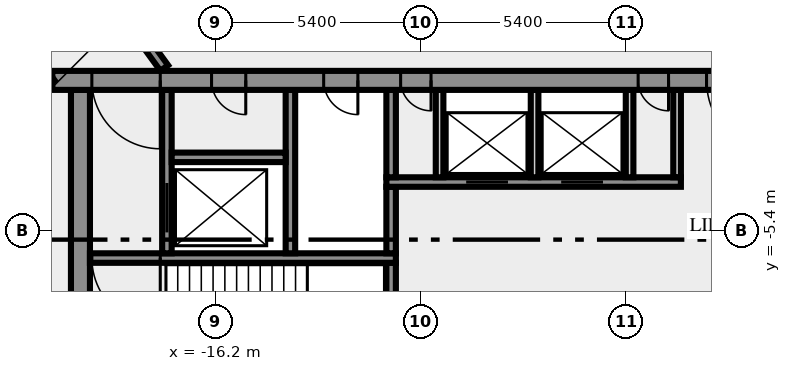
"""IFC4 building model, lengths in metres.
Left out: names, types, materials, properties, quantities, classifications, styles, units other than length and angle.
Written with IfcOpenShell. Run it as: python <this file> out.ifc"""

import sys

from ifc_helpers import new_model, si_unit, direction, frame, frame_2d, origin, place, context, subcontext, project, spatial, rectangle, extrude, element, fill, save


model = new_model("IFC4")
c1 = context("Model", 3, precision=1e-05, world=origin(), true_north=direction((0.0, 1.0)))
c2 = subcontext(c1, "Body", "Model", "MODEL_VIEW")
j1 = project(units=[si_unit("LENGTHUNIT", "METRE"), si_unit("PLANEANGLEUNIT", "RADIAN")], contexts=[c1])
p1 = place(None, origin())
s1 = spatial("IfcSite", under=j1, at=p1, CompositionType="ELEMENT")
p2 = place(p1, origin())
s2 = spatial("IfcBuilding", under=s1, at=p2, CompositionType="ELEMENT")
p3 = place(p2, frame((0.0, 0.0, 289.0)))
s3 = spatial("IfcBuildingStorey", under=s2, at=p3, CompositionType="ELEMENT", Elevation=289.0)
p4 = place(p3, frame((-19.75, -10.5, 0.0), z_axis=(0.0, 0.0, 1.0), x_axis=(0.0, 1.0, 0.0)))
e1 = element("IfcWall", 1, at=p4, inside=s3, PredefinedType="SHEAR", context=c2, shape_type="SweptSolid", body=[
    extrude(rectangle(XDim=8.8, YDim=0.5, at=frame_2d((4.4, 0.0))), origin(), (0.0, 0.0, 1.0), 3.65),
])
p5 = place(p3, frame((-11.575, -7.25, 0.0), z_axis=(0.0, 0.0, 1.0), x_axis=(0.0, 1.0, 0.0)))
e2 = element("IfcWall", 2, at=p5, inside=s3, PredefinedType="SHEAR", context=c2, shape_type="SweptSolid", body=[
    extrude(rectangle(XDim=1.0, YDim=0.25, at=frame_2d((0.5, 0.0))), origin(), (0.0, 0.0, 1.0), 3.65),
])
p6 = place(p3, frame((-11.45, -6.125, 0.0), z_axis=(0.0, 0.0, 1.0), x_axis=(-1.0, 0.0, 0.0)))
e3 = element("IfcWall", 3, at=p6, inside=s3, PredefinedType="SHEAR", context=c2, shape_type="SweptSolid", body=[
    extrude(rectangle(XDim=8.05, YDim=0.25, at=frame_2d((4.025, 0.0))), origin(), (0.0, 0.0, 1.0), 3.65),
])
p7 = place(p6, frame((6.2, 0.0, 0.0)))
e4 = element("IfcOpeningElement", 4, at=p7, cuts=e3, PredefinedType="OPENING", context=c2, shape_type="SweptSolid", body=[
    extrude(rectangle(XDim=1.8, YDim=2.1, at=frame_2d((0.9, 1.05))), frame((0.0, 0.135, 0.0), z_axis=(0.0, -1.0, 0.0), x_axis=(1.0, 0.0, 0.0)), (0.0, 0.0, 1.0), 0.27),
])
p8 = place(p3, frame((-17.475, -6.0, 0.0), z_axis=(0.0, 0.0, 1.0), x_axis=(0.0, 1.0, 0.0)))
e5 = element("IfcWall", 5, at=p8, inside=s3, PredefinedType="SHEAR", context=c2, shape_type="SweptSolid", body=[
    extrude(rectangle(XDim=4.3, YDim=0.25, at=frame_2d((2.15, 0.0))), origin(), (0.0, 0.0, 1.0), 3.65),
])
p9 = place(p8, frame((0.55, 0.0, 0.0)))
e6 = element("IfcOpeningElement", 6, at=p9, cuts=e5, PredefinedType="OPENING", context=c2, shape_type="SweptSolid", body=[
    extrude(rectangle(XDim=1.3, YDim=2.1, at=frame_2d((0.65, 1.05))), frame((0.0, 0.135, 0.0), z_axis=(0.0, -1.0, 0.0), x_axis=(1.0, 0.0, 0.0)), (0.0, 0.0, 1.0), 0.27),
])
p10 = place(p3, frame((-14.225, -6.0, 0.0), z_axis=(0.0, 0.0, 1.0), x_axis=(0.0, 1.0, 0.0)))
e7 = element("IfcWall", 7, at=p10, inside=s3, PredefinedType="SHEAR", context=c2, shape_type="SweptSolid", body=[
    extrude(rectangle(XDim=4.3, YDim=0.25, at=frame_2d((2.15, 0.0))), origin(), (0.0, 0.0, 1.0), 3.65),
])
p11 = place(p3, frame((-11.575, -6.0, 0.0), z_axis=(0.0, 0.0, 1.0), x_axis=(0.0, 1.0, 0.0)))
e8 = element("IfcWall", 8, at=p11, inside=s3, PredefinedType="SHEAR", context=c2, shape_type="SweptSolid", body=[
    extrude(rectangle(XDim=1.75, YDim=0.25, at=frame_2d((0.875, 0.0))), origin(), (0.0, 0.0, 1.0), 3.65),
])
p12 = place(p3, frame((-11.7, -4.125, 0.0), z_axis=(0.0, 0.0, 1.0), x_axis=(1.0, 0.0, 0.0)))
e9 = element("IfcWall", 9, at=p12, inside=s3, PredefinedType="SHEAR", context=c2, shape_type="SweptSolid", body=[
    extrude(rectangle(XDim=7.75, YDim=0.25, at=frame_2d((3.875, 0.0))), origin(), (0.0, 0.0, 1.0), 3.65),
])
p13 = place(p12, frame((2.1, 0.0, 0.0)))
e10 = element("IfcOpeningElement", 10, at=p13, cuts=e9, PredefinedType="OPENING", context=c2, shape_type="SweptSolid", body=[
    extrude(rectangle(XDim=1.1, YDim=2.1, at=frame_2d((0.55, 1.05))), frame((0.0, 0.135, 0.0), z_axis=(0.0, -1.0, 0.0), x_axis=(1.0, 0.0, 0.0)), (0.0, 0.0, 1.0), 0.27),
])
p14 = place(p12, frame((4.6, 0.0, 0.0)))
e11 = element("IfcOpeningElement", 11, at=p14, cuts=e9, PredefinedType="OPENING", context=c2, shape_type="SweptSolid", body=[
    extrude(rectangle(XDim=1.1, YDim=2.1, at=frame_2d((0.55, 1.05))), frame((0.0, 0.135, 0.0), z_axis=(0.0, -1.0, 0.0), x_axis=(1.0, 0.0, 0.0)), (0.0, 0.0, 1.0), 0.27),
])
p15 = place(p3, frame((-11.575, -4.0, 0.0), z_axis=(0.0, 0.0, 1.0), x_axis=(0.0, 1.0, 0.0)))
e12 = element("IfcWall", 12, at=p15, inside=s3, PredefinedType="SHEAR", context=c2, shape_type="SweptSolid", body=[
    extrude(rectangle(XDim=2.3, YDim=0.25, at=frame_2d((1.15, 0.0))), origin(), (0.0, 0.0, 1.0), 3.65),
])
for number, where, z_axis, x_axis in (
    (13, (-10.3, -4.0, 0.0), (0.0, 0.0, 1.0), (0.0, 1.0, 0.0)),
    (14, (-7.8, -4.0, 0.0), (0.0, 0.0, 1.0), (0.0, 1.0, 0.0)),
    (15, (-5.3, -4.0, 0.0), (0.0, 0.0, 1.0), (0.0, 1.0, 0.0)),
    (16, (-4.05, -4.0, 0.0), (0.0, 0.0, 1.0), (0.0, 1.0, 0.0)),
):
    element("IfcWall", number, at=place(p3, frame(where, z_axis=z_axis, x_axis=x_axis)), inside=s3, PredefinedType="SOLIDWALL", context=c2, shape_type="SweptSolid", body=[
        extrude(rectangle(XDim=2.3, YDim=0.2, at=frame_2d((1.15, 0.0))), origin(), (0.0, 0.0, 1.0), 3.65),
    ])
p16 = place(p3, frame((-17.35, -3.475, 0.0), z_axis=(0.0, 0.0, 1.0), x_axis=(1.0, 0.0, 0.0)))
e17 = element("IfcWall", 17, at=p16, inside=s3, PredefinedType="SHEAR", context=c2, shape_type="SweptSolid", body=[
    extrude(rectangle(XDim=3.0, YDim=0.25, at=frame_2d((1.5, 0.0))), origin(), (0.0, 0.0, 1.0), 3.65),
])
p17 = place(p3, frame((20.49, -1.45, 0.0), z_axis=(0.0, 0.0, 1.0), x_axis=(-1.0, 0.0, 0.0)))
e18 = element("IfcWall", 18, at=p17, inside=s3, PredefinedType="SHEAR", context=c2, shape_type="SweptSolid", body=[
    extrude(rectangle(XDim=40.98, YDim=0.5, at=frame_2d((20.49, 0.0))), origin(), (0.0, 0.0, 1.0), 3.65),
])
p18 = place(p17, frame((38.14, 0.0, 0.0)))
e19 = element("IfcOpeningElement", 19, at=p18, cuts=e18, PredefinedType="OPENING", context=c2, shape_type="SweptSolid", body=[
    extrude(rectangle(XDim=1.8, YDim=2.1, at=frame_2d((0.9, 1.05))), frame((0.0, 0.26, 0.0), z_axis=(0.0, -1.0, 0.0), x_axis=(1.0, 0.0, 0.0)), (0.0, 0.0, 1.0), 0.52),
])
p19 = place(p17, frame((35.89, 0.0, 0.0)))
e20 = element("IfcOpeningElement", 20, at=p19, cuts=e18, PredefinedType="OPENING", context=c2, shape_type="SweptSolid", body=[
    extrude(rectangle(XDim=0.9, YDim=2.1, at=frame_2d((0.45, 1.05))), frame((0.0, 0.26, 0.0), z_axis=(0.0, -1.0, 0.0), x_axis=(1.0, 0.0, 0.0)), (0.0, 0.0, 1.0), 0.52),
])
p20 = place(p17, frame((32.94, 0.0, 0.0)))
e21 = element("IfcOpeningElement", 21, at=p20, cuts=e18, PredefinedType="OPENING", context=c2, shape_type="SweptSolid", body=[
    extrude(rectangle(XDim=0.9, YDim=2.1, at=frame_2d((0.45, 1.05))), frame((0.0, 0.26, 0.0), z_axis=(0.0, -1.0, 0.0), x_axis=(1.0, 0.0, 0.0)), (0.0, 0.0, 1.0), 0.52),
])
p21 = place(p17, frame((31.015, 0.0, 0.0)))
e22 = element("IfcOpeningElement", 22, at=p21, cuts=e18, PredefinedType="OPENING", context=c2, shape_type="SweptSolid", body=[
    extrude(rectangle(XDim=0.8, YDim=2.1, at=frame_2d((0.4, 1.05))), frame((0.0, 0.26, 0.0), z_axis=(0.0, -1.0, 0.0), x_axis=(1.0, 0.0, 0.0)), (0.0, 0.0, 1.0), 0.52),
])
p22 = place(p17, frame((24.765, 0.0, 0.0)))
e23 = element("IfcOpeningElement", 23, at=p22, cuts=e18, PredefinedType="OPENING", context=c2, shape_type="SweptSolid", body=[
    extrude(rectangle(XDim=0.8, YDim=2.1, at=frame_2d((0.4, 1.05))), frame((0.0, 0.26, 0.0), z_axis=(0.0, -1.0, 0.0), x_axis=(1.0, 0.0, 0.0)), (0.0, 0.0, 1.0), 0.52),
])
p23 = place(p17, frame((21.765, 0.0, 0.0)))
e24 = element("IfcOpeningElement", 24, at=p23, cuts=e18, PredefinedType="OPENING", context=c2, shape_type="SweptSolid", body=[
    extrude(rectangle(XDim=2.0, YDim=2.1, at=frame_2d((1.0, 1.05))), frame((0.0, 0.26, 0.0), z_axis=(0.0, -1.0, 0.0), x_axis=(1.0, 0.0, 0.0)), (0.0, 0.0, 1.0), 0.52),
])
p24 = place(p17, frame((15.202, 0.0, 0.0)))
e25 = element("IfcOpeningElement", 25, at=p24, cuts=e18, PredefinedType="OPENING", context=c2, shape_type="SweptSolid", body=[
    extrude(rectangle(XDim=0.9, YDim=2.1, at=frame_2d((0.45, 1.05))), frame((0.0, 0.26, 0.0), z_axis=(0.0, -1.0, 0.0), x_axis=(1.0, 0.0, 0.0)), (0.0, 0.0, 1.0), 0.52),
])
p25 = place(p17, frame((13.54, 0.0, 0.0)))
e26 = element("IfcOpeningElement", 26, at=p25, cuts=e18, PredefinedType="OPENING", context=c2, shape_type="SweptSolid", body=[
    extrude(rectangle(XDim=0.9, YDim=2.1, at=frame_2d((0.45, 1.05))), frame((0.0, 0.26, 0.0), z_axis=(0.0, -1.0, 0.0), x_axis=(1.0, 0.0, 0.0)), (0.0, 0.0, 1.0), 0.52),
])
p26 = place(p17, frame((11.64, 0.0, 0.0)))
e27 = element("IfcOpeningElement", 27, at=p26, cuts=e18, PredefinedType="OPENING", context=c2, shape_type="SweptSolid", body=[
    extrude(rectangle(XDim=0.9, YDim=2.1, at=frame_2d((0.45, 1.05))), frame((0.0, 0.26, 0.0), z_axis=(0.0, -1.0, 0.0), x_axis=(1.0, 0.0, 0.0)), (0.0, 0.0, 1.0), 0.52),
])
p27 = place(p17, frame((9.577, 0.0, 0.0)))
e28 = element("IfcOpeningElement", 28, at=p27, cuts=e18, PredefinedType="OPENING", context=c2, shape_type="SweptSolid", body=[
    extrude(rectangle(XDim=0.9, YDim=2.1, at=frame_2d((0.45, 1.05))), frame((0.0, 0.26, 0.0), z_axis=(0.0, -1.0, 0.0), x_axis=(1.0, 0.0, 0.0)), (0.0, 0.0, 1.0), 0.52),
])
p28 = place(p17, frame((7.14, 0.0, 0.0)))
e29 = element("IfcOpeningElement", 29, at=p28, cuts=e18, PredefinedType="OPENING", context=c2, shape_type="SweptSolid", body=[
    extrude(rectangle(XDim=0.9, YDim=2.1, at=frame_2d((0.45, 1.05))), frame((0.0, 0.26, 0.0), z_axis=(0.0, -1.0, 0.0), x_axis=(1.0, 0.0, 0.0)), (0.0, 0.0, 1.0), 0.52),
])
p29 = place(p17, frame((5.028, 0.0, 0.0)))
e30 = element("IfcOpeningElement", 30, at=p29, cuts=e18, PredefinedType="OPENING", context=c2, shape_type="SweptSolid", body=[
    extrude(rectangle(XDim=0.8, YDim=2.1, at=frame_2d((0.4, 1.05))), frame((0.0, 0.26, 0.0), z_axis=(0.0, -1.0, 0.0), x_axis=(1.0, 0.0, 0.0)), (0.0, 0.0, 1.0), 0.52),
])
p30 = place(p17, frame((3.452, 0.0, 0.0)))
e31 = element("IfcOpeningElement", 31, at=p30, cuts=e18, PredefinedType="OPENING", context=c2, shape_type="SweptSolid", body=[
    extrude(rectangle(XDim=0.8, YDim=2.1, at=frame_2d((0.4, 1.05))), frame((0.0, 0.26, 0.0), z_axis=(0.0, -1.0, 0.0), x_axis=(1.0, 0.0, 0.0)), (0.0, 0.0, 1.0), 0.52),
])
p31 = place(p17, frame((1.04, 0.0, 0.0)))
e32 = element("IfcOpeningElement", 32, at=p31, cuts=e18, PredefinedType="OPENING", context=c2, shape_type="SweptSolid", body=[
    extrude(rectangle(XDim=1.8, YDim=2.1, at=frame_2d((0.9, 1.05))), frame((0.0, 0.26, 0.0), z_axis=(0.0, -1.0, 0.0), x_axis=(1.0, 0.0, 0.0)), (0.0, 0.0, 1.0), 0.52),
])
p32 = place(p3, frame((-20.531, -1.523, 0.0), z_axis=(0.0, 0.0, 1.0), x_axis=(-0.587782646447, 0.809018887626, 0.0)))
e33 = element("IfcWall", 33, at=p32, inside=s3, PredefinedType="SOLIDWALL", context=c2, shape_type="SweptSolid", body=[
    extrude(rectangle(XDim=11.27, YDim=0.25, at=frame_2d((5.635, 0.0))), origin(), (0.0, 0.0, 1.0), 3.65),
])
p33 = place(p32, frame((6.216, 0.0, 0.0)))
e34 = element("IfcOpeningElement", 34, at=p33, cuts=e33, PredefinedType="OPENING", context=c2, shape_type="SweptSolid", body=[
    extrude(rectangle(XDim=0.9, YDim=2.1, at=frame_2d((0.45, 1.05))), frame((0.0, 0.135, 0.0), z_axis=(0.0, -1.0, 0.0), x_axis=(1.0, 0.0, 0.0)), (0.0, 0.0, 1.0), 0.27),
])
p34 = place(p32, frame((9.896, 0.0, 0.0)))
e35 = element("IfcOpeningElement", 35, at=p34, cuts=e33, PredefinedType="OPENING", context=c2, shape_type="SweptSolid", body=[
    extrude(rectangle(XDim=0.9, YDim=2.1, at=frame_2d((0.45, 1.05))), frame((0.0, 0.135, 0.0), z_axis=(0.0, -1.0, 0.0), x_axis=(1.0, 0.0, 0.0)), (0.0, 0.0, 1.0), 0.27),
])
p35 = place(p3, frame((-24.865, 8.95, 0.0), z_axis=(0.0, 0.0, 1.0), x_axis=(0.587791617212, -0.809012369952, 0.0)))
e36 = element("IfcWall", 36, at=p35, inside=s3, PredefinedType="SOLIDWALL", context=c2, shape_type="SweptSolid", body=[
    extrude(rectangle(XDim=12.453, YDim=0.25, at=frame_2d((6.227, 0.0))), origin(), (0.0, 0.0, 1.0), 3.65),
])
p36 = place(p35, frame((8.112, 0.0, 0.0)))
e37 = element("IfcOpeningElement", 37, at=p36, cuts=e36, PredefinedType="OPENING", context=c2, shape_type="SweptSolid", body=[
    extrude(rectangle(XDim=0.9, YDim=2.1, at=frame_2d((0.45, 1.05))), frame((0.0, 0.135, 0.0), z_axis=(0.0, -1.0, 0.0), x_axis=(1.0, 0.0, 0.0)), (0.0, 0.0, 1.0), 0.27),
])
p37 = place(p7, origin())
e38 = element("IfcDoor", 38, at=p37, inside=s3, OperationType="DOUBLE_DOOR_SINGLE_SWING", PredefinedType="DOOR", context=c2, shape_type="SweptSolid", body=[
    extrude(rectangle(XDim=1.8, YDim=2.1, at=frame_2d((0.9, 1.05))), frame((0.0, 0.025, 0.0), z_axis=(0.0, -1.0, 0.0), x_axis=(1.0, 0.0, 0.0)), (0.0, 0.0, 1.0), 0.05),
])
fill(e4, e38)
p38 = place(p9, origin())
e39 = element("IfcDoor", 39, at=p38, inside=s3, OperationType="DOUBLE_DOOR_SLIDING", PredefinedType="DOOR", context=c2, shape_type="SweptSolid", body=[
    extrude(rectangle(XDim=1.3, YDim=2.1, at=frame_2d((0.65, 1.05))), frame((0.0, 0.025, 0.0), z_axis=(0.0, -1.0, 0.0), x_axis=(1.0, 0.0, 0.0)), (0.0, 0.0, 1.0), 0.05),
])
fill(e6, e39)
p39 = place(p13, origin())
e40 = element("IfcDoor", 40, at=p39, inside=s3, OperationType="DOUBLE_DOOR_SLIDING", PredefinedType="DOOR", context=c2, shape_type="SweptSolid", body=[
    extrude(rectangle(XDim=1.1, YDim=2.1, at=frame_2d((0.55, 1.05))), frame((0.0, 0.025, 0.0), z_axis=(0.0, -1.0, 0.0), x_axis=(1.0, 0.0, 0.0)), (0.0, 0.0, 1.0), 0.05),
])
fill(e10, e40)
p40 = place(p14, origin())
e41 = element("IfcDoor", 41, at=p40, inside=s3, OperationType="DOUBLE_DOOR_SLIDING", PredefinedType="DOOR", context=c2, shape_type="SweptSolid", body=[
    extrude(rectangle(XDim=1.1, YDim=2.1, at=frame_2d((0.55, 1.05))), frame((0.0, 0.025, 0.0), z_axis=(0.0, -1.0, 0.0), x_axis=(1.0, 0.0, 0.0)), (0.0, 0.0, 1.0), 0.05),
])
fill(e11, e41)
p41 = place(p18, origin())
e42 = element("IfcDoor", 42, at=p41, inside=s3, OperationType="DOUBLE_DOOR_SINGLE_SWING", PredefinedType="DOOR", context=c2, shape_type="SweptSolid", body=[
    extrude(rectangle(XDim=1.8, YDim=2.1, at=frame_2d((0.9, 1.05))), frame((0.0, 0.025, 0.0), z_axis=(0.0, -1.0, 0.0), x_axis=(1.0, 0.0, 0.0)), (0.0, 0.0, 1.0), 0.05),
])
fill(e19, e42)
p42 = place(p19, origin())
e43 = element("IfcDoor", 43, at=p42, inside=s3, OperationType="SINGLE_SWING_RIGHT", PredefinedType="DOOR", context=c2, shape_type="SweptSolid", body=[
    extrude(rectangle(XDim=0.9, YDim=2.1, at=frame_2d((0.45, 1.05))), frame((0.0, 0.025, 0.0), z_axis=(0.0, -1.0, 0.0), x_axis=(1.0, 0.0, 0.0)), (0.0, 0.0, 1.0), 0.05),
])
fill(e20, e43)
p43 = place(p20, origin())
e44 = element("IfcDoor", 44, at=p43, inside=s3, OperationType="SINGLE_SWING_RIGHT", PredefinedType="DOOR", context=c2, shape_type="SweptSolid", body=[
    extrude(rectangle(XDim=0.9, YDim=2.1, at=frame_2d((0.45, 1.05))), frame((0.0, 0.025, 0.0), z_axis=(0.0, -1.0, 0.0), x_axis=(1.0, 0.0, 0.0)), (0.0, 0.0, 1.0), 0.05),
])
fill(e21, e44)
p44 = place(p21, origin())
e45 = element("IfcDoor", 45, at=p44, inside=s3, OperationType="SINGLE_SWING_RIGHT", PredefinedType="DOOR", context=c2, shape_type="SweptSolid", body=[
    extrude(rectangle(XDim=0.8, YDim=2.1, at=frame_2d((0.4, 1.05))), frame((0.0, 0.025, 0.0), z_axis=(0.0, -1.0, 0.0), x_axis=(1.0, 0.0, 0.0)), (0.0, 0.0, 1.0), 0.05),
])
fill(e22, e45)
p45 = place(p22, origin())
e46 = element("IfcDoor", 46, at=p45, inside=s3, OperationType="SINGLE_SWING_RIGHT", PredefinedType="DOOR", context=c2, shape_type="SweptSolid", body=[
    extrude(rectangle(XDim=0.8, YDim=2.1, at=frame_2d((0.4, 1.05))), frame((0.0, 0.025, 0.0), z_axis=(0.0, -1.0, 0.0), x_axis=(1.0, 0.0, 0.0)), (0.0, 0.0, 1.0), 0.05),
])
fill(e23, e46)
p46 = place(p23, origin())
e47 = element("IfcDoor", 47, at=p46, inside=s3, OperationType="DOUBLE_DOOR_SINGLE_SWING", PredefinedType="DOOR", context=c2, shape_type="SweptSolid", body=[
    extrude(rectangle(XDim=2.0, YDim=2.1, at=frame_2d((1.0, 1.05))), frame((0.0, 0.025, 0.0), z_axis=(0.0, -1.0, 0.0), x_axis=(1.0, 0.0, 0.0)), (0.0, 0.0, 1.0), 0.05),
])
fill(e24, e47)
save(model, sys.argv[1])
